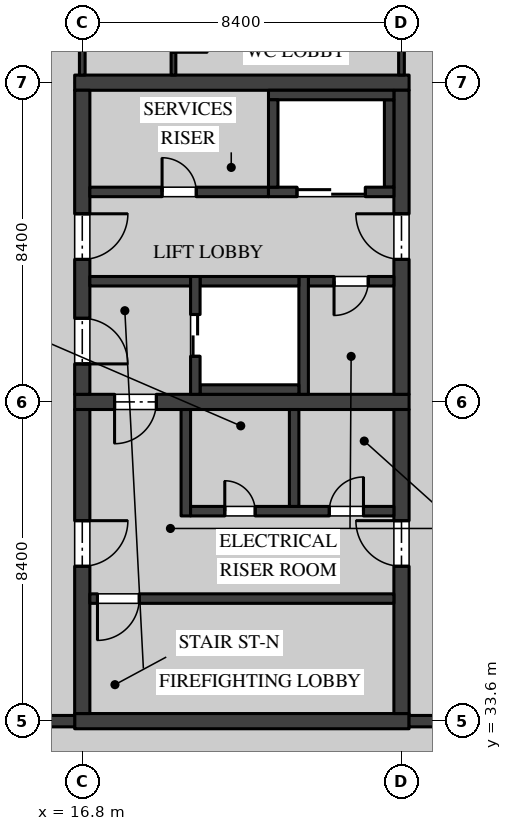
"""IFC4 building model, lengths in metres.
Left out: names, types, materials, properties, quantities, classifications, styles, units other than length and angle.
Written with IfcOpenShell. Run it as: python <this file> out.ifc"""

import sys

from ifc_helpers import new_model, si_unit, direction, frame, frame_2d, origin, place, context, subcontext, project, spatial, rectangle, extrude, element, fill, save


model = new_model("IFC4")
c1 = context("Model", 3, precision=1e-05, world=origin(), true_north=direction((0.0, 1.0)))
c2 = subcontext(c1, "Body", "Model", "MODEL_VIEW")
j1 = project(units=[si_unit("LENGTHUNIT", "METRE"), si_unit("PLANEANGLEUNIT", "RADIAN")], contexts=[c1])
p1 = place(None, origin())
s1 = spatial("IfcSite", under=j1, at=p1, CompositionType="ELEMENT")
p2 = place(p1, origin())
s2 = spatial("IfcBuilding", under=s1, at=p2, CompositionType="ELEMENT")
p3 = place(p2, frame((0.0, 0.0, 5.4)))
s3 = spatial("IfcBuildingStorey", under=s2, at=p3, CompositionType="ELEMENT", Elevation=5.4)
p4 = place(p3, frame((16.6, 42.0, 0.0), z_axis=(0.0, 0.0, 1.0), x_axis=(1.0, 0.0, 0.0)))
e1 = element("IfcWall", 1, at=p4, inside=s3, PredefinedType="SHEAR", context=c2, shape_type="SweptSolid", body=[
    extrude(rectangle(XDim=8.8, YDim=0.4, at=frame_2d((4.4, 0.0))), origin(), (0.0, 0.0, 1.0), 4.37),
])
p5 = place(p4, frame((1.05, 0.0, 0.0)))
e2 = element("IfcOpeningElement", 2, at=p5, cuts=e1, PredefinedType="OPENING", context=c2, shape_type="SweptSolid", body=[
    extrude(rectangle(XDim=1.1, YDim=2.1, at=frame_2d((0.55, 1.05))), frame((0.0, 0.21, 0.0), z_axis=(0.0, -1.0, 0.0), x_axis=(1.0, 0.0, 0.0)), (0.0, 0.0, 1.0), 0.42),
])
p6 = place(p3, frame((16.6, 50.4, 0.0), z_axis=(0.0, 0.0, 1.0), x_axis=(1.0, 0.0, 0.0)))
e3 = element("IfcWall", 3, at=p6, inside=s3, PredefinedType="SHEAR", context=c2, shape_type="SweptSolid", body=[
    extrude(rectangle(XDim=8.8, YDim=0.4, at=frame_2d((4.4, 0.0))), origin(), (0.0, 0.0, 1.0), 4.37),
])
p7 = place(p3, frame((16.8, 42.2, 0.0), z_axis=(0.0, 0.0, 1.0), x_axis=(0.0, 1.0, 0.0)))
e4 = element("IfcWall", 4, at=p7, inside=s3, PredefinedType="SHEAR", context=c2, shape_type="SweptSolid", body=[
    extrude(rectangle(XDim=8.0, YDim=0.4, at=frame_2d((4.0, 0.0))), origin(), (0.0, 0.0, 1.0), 4.37),
])
p8 = place(p7, frame((3.55, 0.0, 0.0)))
e5 = element("IfcOpeningElement", 5, at=p8, cuts=e4, PredefinedType="OPENING", context=c2, shape_type="SweptSolid", body=[
    extrude(rectangle(XDim=1.2, YDim=2.1, at=frame_2d((0.6, 1.05))), frame((0.0, 0.21, 0.0), z_axis=(0.0, -1.0, 0.0), x_axis=(1.0, 0.0, 0.0)), (0.0, 0.0, 1.0), 0.42),
])
p9 = place(p7, frame((0.8, 0.0, 0.0)))
e6 = element("IfcOpeningElement", 6, at=p9, cuts=e4, PredefinedType="OPENING", context=c2, shape_type="SweptSolid", body=[
    extrude(rectangle(XDim=1.2, YDim=2.1, at=frame_2d((0.6, 1.05))), frame((0.0, 0.21, 0.0), z_axis=(0.0, -1.0, 0.0), x_axis=(1.0, 0.0, 0.0)), (0.0, 0.0, 1.0), 0.42),
])
p10 = place(p3, frame((25.2, 42.2, 0.0), z_axis=(0.0, 0.0, 1.0), x_axis=(0.0, 1.0, 0.0)))
e7 = element("IfcWall", 7, at=p10, inside=s3, PredefinedType="SHEAR", context=c2, shape_type="SweptSolid", body=[
    extrude(rectangle(XDim=8.0, YDim=0.4, at=frame_2d((4.0, 0.0))), origin(), (0.0, 0.0, 1.0), 4.37),
])
p11 = place(p10, frame((3.55, 0.0, 0.0)))
e8 = element("IfcOpeningElement", 8, at=p11, cuts=e7, PredefinedType="OPENING", context=c2, shape_type="SweptSolid", body=[
    extrude(rectangle(XDim=1.2, YDim=2.1, at=frame_2d((0.6, 1.05))), frame((0.0, 0.21, 0.0), z_axis=(0.0, -1.0, 0.0), x_axis=(1.0, 0.0, 0.0)), (0.0, 0.0, 1.0), 0.42),
])
p12 = place(p3, frame((21.7, 47.525, 0.0), z_axis=(0.0, 0.0, 1.0), x_axis=(-1.0, 0.0, 0.0)))
e9 = element("IfcWall", 9, at=p12, inside=s3, PredefinedType="SOLIDWALL", context=c2, shape_type="SweptSolid", body=[
    extrude(rectangle(XDim=4.7, YDim=0.25, at=frame_2d((2.35, 0.0))), origin(), (0.0, 0.0, 1.0), 4.37),
])
p13 = place(p12, frame((1.9, 0.0, 0.0)))
e10 = element("IfcOpeningElement", 10, at=p13, cuts=e9, PredefinedType="OPENING", context=c2, shape_type="SweptSolid", body=[
    extrude(rectangle(XDim=0.9, YDim=2.1, at=frame_2d((0.45, 1.05))), frame((0.0, 0.135, 0.0), z_axis=(0.0, -1.0, 0.0), x_axis=(1.0, 0.0, 0.0)), (0.0, 0.0, 1.0), 0.27),
])
p14 = place(p3, frame((25.0, 45.175, 0.0), z_axis=(0.0, 0.0, 1.0), x_axis=(-1.0, 0.0, 0.0)))
e11 = element("IfcWall", 11, at=p14, inside=s3, PredefinedType="SOLIDWALL", context=c2, shape_type="SweptSolid", body=[
    extrude(rectangle(XDim=2.25, YDim=0.25, at=frame_2d((1.125, 0.0))), origin(), (0.0, 0.0, 1.0), 4.37),
])
p15 = place(p14, frame((0.675, 0.0, 0.0)))
e12 = element("IfcOpeningElement", 12, at=p15, cuts=e11, PredefinedType="OPENING", context=c2, shape_type="SweptSolid", body=[
    extrude(rectangle(XDim=0.9, YDim=2.1, at=frame_2d((0.45, 1.05))), frame((0.0, 0.135, 0.0), z_axis=(0.0, -1.0, 0.0), x_axis=(1.0, 0.0, 0.0)), (0.0, 0.0, 1.0), 0.27),
])
p16 = place(p3, frame((19.65, 45.175, 0.0), z_axis=(0.0, 0.0, 1.0), x_axis=(-1.0, 0.0, 0.0)))
e13 = element("IfcWall", 13, at=p16, inside=s3, PredefinedType="SOLIDWALL", context=c2, shape_type="SweptSolid", body=[
    extrude(rectangle(XDim=2.65, YDim=0.25, at=frame_2d((1.325, 0.0))), origin(), (0.0, 0.0, 1.0), 4.37),
])
p17 = place(p3, frame((16.6, 33.6, 0.0), z_axis=(0.0, 0.0, 1.0), x_axis=(1.0, 0.0, 0.0)))
e14 = element("IfcWall", 14, at=p17, inside=s3, PredefinedType="SHEAR", context=c2, shape_type="SweptSolid", body=[
    extrude(rectangle(XDim=8.8, YDim=0.4, at=frame_2d((4.4, 0.0))), origin(), (0.0, 0.0, 1.0), 4.37),
])
p18 = place(p3, frame((16.8, 33.8, 0.0), z_axis=(0.0, 0.0, 1.0), x_axis=(0.0, 1.0, 0.0)))
e15 = element("IfcWall", 15, at=p18, inside=s3, PredefinedType="SHEAR", context=c2, shape_type="SweptSolid", body=[
    extrude(rectangle(XDim=8.0, YDim=0.4, at=frame_2d((4.0, 0.0))), origin(), (0.0, 0.0, 1.0), 4.37),
])
p19 = place(p18, frame((3.875, 0.0, 0.0)))
e16 = element("IfcOpeningElement", 16, at=p19, cuts=e15, PredefinedType="OPENING", context=c2, shape_type="SweptSolid", body=[
    extrude(rectangle(XDim=1.2, YDim=2.1, at=frame_2d((0.6, 1.05))), frame((0.0, 0.21, 0.0), z_axis=(0.0, -1.0, 0.0), x_axis=(1.0, 0.0, 0.0)), (0.0, 0.0, 1.0), 0.42),
])
p20 = place(p3, frame((25.2, 33.8, 0.0), z_axis=(0.0, 0.0, 1.0), x_axis=(0.0, 1.0, 0.0)))
e17 = element("IfcWall", 17, at=p20, inside=s3, PredefinedType="SHEAR", context=c2, shape_type="SweptSolid", body=[
    extrude(rectangle(XDim=8.0, YDim=0.4, at=frame_2d((4.0, 0.0))), origin(), (0.0, 0.0, 1.0), 4.37),
])
p21 = place(p20, frame((3.875, 0.0, 0.0)))
e18 = element("IfcOpeningElement", 18, at=p21, cuts=e17, PredefinedType="OPENING", context=c2, shape_type="SweptSolid", body=[
    extrude(rectangle(XDim=1.2, YDim=2.1, at=frame_2d((0.6, 1.05))), frame((0.0, 0.21, 0.0), z_axis=(0.0, -1.0, 0.0), x_axis=(1.0, 0.0, 0.0)), (0.0, 0.0, 1.0), 0.42),
])
p22 = place(p3, frame((17.0, 36.825, 0.0), z_axis=(0.0, 0.0, 1.0), x_axis=(1.0, 0.0, 0.0)))
e19 = element("IfcWall", 19, at=p22, inside=s3, PredefinedType="SOLIDWALL", context=c2, shape_type="SweptSolid", body=[
    extrude(rectangle(XDim=8.0, YDim=0.25, at=frame_2d((4.0, 0.0))), origin(), (0.0, 0.0, 1.0), 4.37),
])
p23 = place(p22, frame((0.2, 0.0, 0.0)))
e20 = element("IfcOpeningElement", 20, at=p23, cuts=e19, PredefinedType="OPENING", context=c2, shape_type="SweptSolid", body=[
    extrude(rectangle(XDim=1.1, YDim=2.1, at=frame_2d((0.55, 1.05))), frame((0.0, 0.135, 0.0), z_axis=(0.0, -1.0, 0.0), x_axis=(1.0, 0.0, 0.0)), (0.0, 0.0, 1.0), 0.27),
])
p24 = place(p3, frame((19.525, 39.0, 0.0), z_axis=(0.0, 0.0, 1.0), x_axis=(0.0, 1.0, 0.0)))
e21 = element("IfcWall", 21, at=p24, inside=s3, PredefinedType="SOLIDWALL", context=c2, shape_type="SweptSolid", body=[
    extrude(rectangle(XDim=2.8, YDim=0.25, at=frame_2d((1.4, 0.0))), origin(), (0.0, 0.0, 1.0), 4.37),
])
p25 = place(p3, frame((19.65, 39.125, 0.0), z_axis=(0.0, 0.0, 1.0), x_axis=(1.0, 0.0, 0.0)))
e22 = element("IfcWall", 22, at=p25, inside=s3, PredefinedType="SOLIDWALL", context=c2, shape_type="SweptSolid", body=[
    extrude(rectangle(XDim=5.35, YDim=0.25, at=frame_2d((2.675, 0.0))), origin(), (0.0, 0.0, 1.0), 4.37),
])
p26 = place(p25, frame((3.65, 0.0, 0.0)))
e23 = element("IfcOpeningElement", 23, at=p26, cuts=e22, PredefinedType="OPENING", context=c2, shape_type="SweptSolid", body=[
    extrude(rectangle(XDim=0.9, YDim=2.1, at=frame_2d((0.45, 1.05))), frame((0.0, 0.135, 0.0), z_axis=(0.0, -1.0, 0.0), x_axis=(1.0, 0.0, 0.0)), (0.0, 0.0, 1.0), 0.27),
])
p27 = place(p25, frame((0.9, 0.0, 0.0)))
e24 = element("IfcOpeningElement", 24, at=p27, cuts=e22, PredefinedType="OPENING", context=c2, shape_type="SweptSolid", body=[
    extrude(rectangle(XDim=0.8, YDim=2.1, at=frame_2d((0.4, 1.05))), frame((0.0, 0.135, 0.0), z_axis=(0.0, -1.0, 0.0), x_axis=(1.0, 0.0, 0.0)), (0.0, 0.0, 1.0), 0.27),
])
p28 = place(p3, frame((22.375, 39.25, 0.0), z_axis=(0.0, 0.0, 1.0), x_axis=(0.0, 1.0, 0.0)))
e25 = element("IfcWall", 25, at=p28, inside=s3, PredefinedType="SOLIDWALL", context=c2, shape_type="SweptSolid", body=[
    extrude(rectangle(XDim=2.55, YDim=0.25, at=frame_2d((1.275, 0.0))), origin(), (0.0, 0.0, 1.0), 4.37),
])
p29 = place(p3, frame((24.875, 47.65, 0.0), z_axis=(0.0, 0.0, 1.0), x_axis=(0.0, 1.0, 0.0)))
e26 = element("IfcWall", 26, at=p29, inside=s3, PredefinedType="SOLIDWALL", context=c2, shape_type="SweptSolid", body=[
    extrude(rectangle(XDim=2.3, YDim=0.25, at=frame_2d((1.15, 0.0))), origin(), (0.0, 0.0, 1.0), 4.37),
])
p30 = place(p3, frame((21.7, 50.075, 0.0), z_axis=(0.0, 0.0, 1.0), x_axis=(1.0, 0.0, 0.0)))
e27 = element("IfcWall", 27, at=p30, inside=s3, PredefinedType="SOLIDWALL", context=c2, shape_type="SweptSolid", body=[
    extrude(rectangle(XDim=3.3, YDim=0.25, at=frame_2d((1.65, 0.0))), origin(), (0.0, 0.0, 1.0), 4.37),
])
p31 = place(p3, frame((21.7, 47.525, 0.0), z_axis=(0.0, 0.0, 1.0), x_axis=(1.0, 0.0, 0.0)))
e28 = element("IfcWall", 28, at=p31, inside=s3, PredefinedType="SOLIDWALL", context=c2, shape_type="SweptSolid", body=[
    extrude(rectangle(XDim=3.3, YDim=0.25, at=frame_2d((1.65, 0.0))), origin(), (0.0, 0.0, 1.0), 4.37),
])
p32 = place(p31, frame((0.75, 0.0, 0.0)))
e29 = element("IfcOpeningElement", 29, at=p32, cuts=e28, PredefinedType="OPENING", context=c2, shape_type="SweptSolid", body=[
    extrude(rectangle(XDim=1.8, YDim=2.1, at=frame_2d((0.9, 1.05))), frame((0.0, 0.135, 0.0), z_axis=(0.0, -1.0, 0.0), x_axis=(1.0, 0.0, 0.0)), (0.0, 0.0, 1.0), 0.27),
])
p33 = place(p3, frame((21.825, 47.65, 0.0), z_axis=(0.0, 0.0, 1.0), x_axis=(0.0, 1.0, 0.0)))
e30 = element("IfcWall", 30, at=p33, inside=s3, PredefinedType="SOLIDWALL", context=c2, shape_type="SweptSolid", body=[
    extrude(rectangle(XDim=2.3, YDim=0.25, at=frame_2d((1.15, 0.0))), origin(), (0.0, 0.0, 1.0), 4.37),
])
p34 = place(p3, frame((22.625, 42.2, 0.0), z_axis=(0.0, 0.0, 1.0), x_axis=(0.0, 1.0, 0.0)))
e31 = element("IfcWall", 31, at=p34, inside=s3, PredefinedType="SOLIDWALL", context=c2, shape_type="SweptSolid", body=[
    extrude(rectangle(XDim=3.1, YDim=0.25, at=frame_2d((1.55, 0.0))), origin(), (0.0, 0.0, 1.0), 4.37),
])
for number, where, z_axis, x_axis in (
    (32, (19.9, 45.175, 0.0), (0.0, 0.0, 1.0), (1.0, 0.0, 0.0)),
    (33, (19.9, 42.325, 0.0), (0.0, 0.0, 1.0), (1.0, 0.0, 0.0)),
):
    element("IfcWall", number, at=place(p3, frame(where, z_axis=z_axis, x_axis=x_axis)), inside=s3, PredefinedType="SOLIDWALL", context=c2, shape_type="SweptSolid", body=[
        extrude(rectangle(XDim=2.6, YDim=0.25, at=frame_2d((1.3, 0.0))), origin(), (0.0, 0.0, 1.0), 4.37),
    ])
p35 = place(p3, frame((19.775, 42.2, 0.0), z_axis=(0.0, 0.0, 1.0), x_axis=(0.0, 1.0, 0.0)))
e34 = element("IfcWall", 34, at=p35, inside=s3, PredefinedType="SOLIDWALL", context=c2, shape_type="SweptSolid", body=[
    extrude(rectangle(XDim=3.1, YDim=0.25, at=frame_2d((1.55, 0.0))), origin(), (0.0, 0.0, 1.0), 4.37),
])
p36 = place(p35, frame((1.0, 0.0, 0.0)))
e35 = element("IfcOpeningElement", 35, at=p36, cuts=e34, PredefinedType="OPENING", context=c2, shape_type="SweptSolid", body=[
    extrude(rectangle(XDim=1.1, YDim=2.1, at=frame_2d((0.55, 1.05))), frame((0.0, 0.135, 0.0), z_axis=(0.0, -1.0, 0.0), x_axis=(1.0, 0.0, 0.0)), (0.0, 0.0, 1.0), 0.27),
])
p37 = place(p3, frame((25.2, 50.6, 0.0), z_axis=(0.0, 0.0, 1.0), x_axis=(0.0, 1.0, 0.0)))
e36 = element("IfcWall", 36, at=p37, inside=s3, PredefinedType="PARTITIONING", context=c2, shape_type="SweptSolid", body=[
    extrude(rectangle(XDim=2.8, YDim=0.15, at=frame_2d((1.4, 0.0))), origin(), (0.0, 0.0, 1.0), 3.746),
])
p38 = place(p3, frame((16.8, 50.6, 0.0), z_axis=(0.0, 0.0, 1.0), x_axis=(0.0, 1.0, 0.0)))
e37 = element("IfcWall", 37, at=p38, inside=s3, PredefinedType="PARTITIONING", context=c2, shape_type="SweptSolid", body=[
    extrude(rectangle(XDim=8.0, YDim=0.15, at=frame_2d((4.0, 0.0))), origin(), (0.0, 0.0, 1.0), 3.746),
])
p39 = place(p38, frame((2.35, 0.0, 0.0)))
e38 = element("IfcOpeningElement", 38, at=p39, cuts=e37, PredefinedType="OPENING", context=c2, shape_type="SweptSolid", body=[
    extrude(rectangle(XDim=0.9, YDim=2.1, at=frame_2d((0.45, 1.05))), frame((0.0, 0.085, 0.0), z_axis=(0.0, -1.0, 0.0), x_axis=(1.0, 0.0, 0.0)), (0.0, 0.0, 1.0), 0.17),
])
p40 = place(p3, frame((19.2, 50.6, 0.0), z_axis=(0.0, 0.0, 1.0), x_axis=(0.0, 1.0, 0.0)))
e39 = element("IfcWall", 39, at=p40, inside=s3, PredefinedType="PARTITIONING", context=c2, shape_type="SweptSolid", body=[
    extrude(rectangle(XDim=2.8, YDim=0.125, at=frame_2d((1.4, 0.0))), origin(), (0.0, 0.0, 1.0), 4.37),
])
p41 = place(p40, frame((0.6, 0.0, 0.0)))
e40 = element("IfcOpeningElement", 40, at=p41, cuts=e39, PredefinedType="OPENING", context=c2, shape_type="SweptSolid", body=[
    extrude(rectangle(XDim=0.9, YDim=2.1, at=frame_2d((0.45, 1.05))), frame((0.0, 0.073, 0.0), z_axis=(0.0, -1.0, 0.0), x_axis=(1.0, 0.0, 0.0)), (0.0, 0.0, 1.0), 0.145),
])
for number, where, z_axis, x_axis in (
    (41, (33.22, 33.6, 0.0), (0.0, 0.0, 1.0), (-1.0, 0.0, 0.0)),
    (42, (16.6, 33.6, 0.0), (0.0, 0.0, 1.0), (-1.0, 0.0, 0.0)),
):
    element("IfcWall", number, at=place(p3, frame(where, z_axis=z_axis, x_axis=x_axis)), inside=s3, PredefinedType="SOLIDWALL", context=c2, shape_type="SweptSolid", body=[
        extrude(rectangle(XDim=7.82, YDim=0.3, at=frame_2d((3.91, 0.0))), origin(), (0.0, 0.0, 1.0), 3.746),
    ])
p42 = place(p8, frame((1.2, 0.0, 0.0), z_axis=(0.0, 0.0, 1.0), x_axis=(-1.0, 0.0, 0.0)))
e43 = element("IfcDoor", 43, at=p42, inside=s3, OperationType="SINGLE_SWING_RIGHT", PredefinedType="DOOR", context=c2, shape_type="SweptSolid", body=[
    extrude(rectangle(XDim=1.2, YDim=2.1, at=frame_2d((0.6, 1.05))), frame((0.0, 0.035, 0.0), z_axis=(0.0, -1.0, 0.0), x_axis=(1.0, 0.0, 0.0)), (0.0, 0.0, 1.0), 0.07),
])
fill(e5, e43)
p43 = place(p11, origin())
e44 = element("IfcDoor", 44, at=p43, inside=s3, OperationType="SINGLE_SWING_LEFT", PredefinedType="DOOR", context=c2, shape_type="SweptSolid", body=[
    extrude(rectangle(XDim=1.2, YDim=2.1, at=frame_2d((0.6, 1.05))), frame((0.0, 0.035, 0.0), z_axis=(0.0, -1.0, 0.0), x_axis=(1.0, 0.0, 0.0)), (0.0, 0.0, 1.0), 0.07),
])
fill(e8, e44)
p44 = place(p9, frame((1.2, 0.0, 0.0), z_axis=(0.0, 0.0, 1.0), x_axis=(-1.0, 0.0, 0.0)))
e45 = element("IfcDoor", 45, at=p44, inside=s3, OperationType="SINGLE_SWING_LEFT", PredefinedType="DOOR", context=c2, shape_type="SweptSolid", body=[
    extrude(rectangle(XDim=1.2, YDim=2.1, at=frame_2d((0.6, 1.05))), frame((0.0, 0.035, 0.0), z_axis=(0.0, -1.0, 0.0), x_axis=(1.0, 0.0, 0.0)), (0.0, 0.0, 1.0), 0.07),
])
fill(e6, e45)
p45 = place(p5, frame((1.1, 0.0, 0.0), z_axis=(0.0, 0.0, 1.0), x_axis=(-1.0, 0.0, 0.0)))
e46 = element("IfcDoor", 46, at=p45, inside=s3, OperationType="SINGLE_SWING_LEFT", PredefinedType="DOOR", context=c2, shape_type="SweptSolid", body=[
    extrude(rectangle(XDim=1.1, YDim=2.1, at=frame_2d((0.55, 1.05))), frame((0.0, 0.035, 0.0), z_axis=(0.0, -1.0, 0.0), x_axis=(1.0, 0.0, 0.0)), (0.0, 0.0, 1.0), 0.07),
])
fill(e2, e46)
p46 = place(p13, frame((0.9, 0.0, 0.0), z_axis=(0.0, 0.0, 1.0), x_axis=(-1.0, 0.0, 0.0)))
e47 = element("IfcDoor", 47, at=p46, inside=s3, OperationType="SINGLE_SWING_RIGHT", PredefinedType="DOOR", context=c2, shape_type="SweptSolid", body=[
    extrude(rectangle(XDim=0.9, YDim=2.1, at=frame_2d((0.45, 1.05))), frame((0.0, 0.035, 0.0), z_axis=(0.0, -1.0, 0.0), x_axis=(1.0, 0.0, 0.0)), (0.0, 0.0, 1.0), 0.07),
])
fill(e10, e47)
p47 = place(p15, origin())
e48 = element("IfcDoor", 48, at=p47, inside=s3, OperationType="SINGLE_SWING_LEFT", PredefinedType="DOOR", context=c2, shape_type="SweptSolid", body=[
    extrude(rectangle(XDim=0.9, YDim=2.1, at=frame_2d((0.45, 1.05))), frame((0.0, 0.05, 0.0), z_axis=(0.0, -1.0, 0.0), x_axis=(1.0, 0.0, 0.0)), (0.0, 0.0, 1.0), 0.1),
])
fill(e12, e48)
p48 = place(p26, origin())
e49 = element("IfcDoor", 49, at=p48, inside=s3, OperationType="SINGLE_SWING_LEFT", PredefinedType="DOOR", context=c2, shape_type="SweptSolid", body=[
    extrude(rectangle(XDim=0.9, YDim=2.1, at=frame_2d((0.45, 1.05))), frame((0.0, 0.035, 0.0), z_axis=(0.0, -1.0, 0.0), x_axis=(1.0, 0.0, 0.0)), (0.0, 0.0, 1.0), 0.07),
])
fill(e23, e49)
p49 = place(p19, frame((1.2, 0.0, 0.0), z_axis=(0.0, 0.0, 1.0), x_axis=(-1.0, 0.0, 0.0)))
e50 = element("IfcDoor", 50, at=p49, inside=s3, OperationType="SINGLE_SWING_RIGHT", PredefinedType="DOOR", context=c2, shape_type="SweptSolid", body=[
    extrude(rectangle(XDim=1.2, YDim=2.1, at=frame_2d((0.6, 1.05))), frame((0.0, 0.035, 0.0), z_axis=(0.0, -1.0, 0.0), x_axis=(1.0, 0.0, 0.0)), (0.0, 0.0, 1.0), 0.07),
])
fill(e16, e50)
p50 = place(p21, origin())
e51 = element("IfcDoor", 51, at=p50, inside=s3, OperationType="SINGLE_SWING_LEFT", PredefinedType="DOOR", context=c2, shape_type="SweptSolid", body=[
    extrude(rectangle(XDim=1.2, YDim=2.1, at=frame_2d((0.6, 1.05))), frame((0.0, 0.035, 0.0), z_axis=(0.0, -1.0, 0.0), x_axis=(1.0, 0.0, 0.0)), (0.0, 0.0, 1.0), 0.07),
])
fill(e18, e51)
p51 = place(p27, origin())
e52 = element("IfcDoor", 52, at=p51, inside=s3, OperationType="SINGLE_SWING_RIGHT", PredefinedType="DOOR", context=c2, shape_type="SweptSolid", body=[
    extrude(rectangle(XDim=0.8, YDim=2.1, at=frame_2d((0.4, 1.05))), frame((0.0, 0.035, 0.0), z_axis=(0.0, -1.0, 0.0), x_axis=(1.0, 0.0, 0.0)), (0.0, 0.0, 1.0), 0.07),
])
fill(e24, e52)
p52 = place(p23, frame((1.1, 0.0, 0.0), z_axis=(0.0, 0.0, 1.0), x_axis=(-1.0, 0.0, 0.0)))
e53 = element("IfcDoor", 53, at=p52, inside=s3, OperationType="SINGLE_SWING_LEFT", PredefinedType="DOOR", context=c2, shape_type="SweptSolid", body=[
    extrude(rectangle(XDim=1.1, YDim=2.1, at=frame_2d((0.55, 1.05))), frame((0.0, 0.035, 0.0), z_axis=(0.0, -1.0, 0.0), x_axis=(1.0, 0.0, 0.0)), (0.0, 0.0, 1.0), 0.07),
])
fill(e20, e53)
p53 = place(p32, origin())
e54 = element("IfcDoor", 54, at=p53, inside=s3, OperationType="DOUBLE_DOOR_SLIDING", PredefinedType="DOOR", context=c2, shape_type="SweptSolid", body=[
    extrude(rectangle(XDim=1.8, YDim=2.1, at=frame_2d((0.9, 1.05))), frame((0.0, 0.04, 0.0), z_axis=(0.0, -1.0, 0.0), x_axis=(1.0, 0.0, 0.0)), (0.0, 0.0, 1.0), 0.08),
])
fill(e29, e54)
p54 = place(p36, origin())
e55 = element("IfcDoor", 55, at=p54, inside=s3, OperationType="DOUBLE_DOOR_SLIDING", PredefinedType="DOOR", context=c2, shape_type="SweptSolid", body=[
    extrude(rectangle(XDim=1.1, YDim=2.1, at=frame_2d((0.55, 1.05))), frame((0.0, 0.04, 0.0), z_axis=(0.0, -1.0, 0.0), x_axis=(1.0, 0.0, 0.0)), (0.0, 0.0, 1.0), 0.08),
])
fill(e35, e55)
save(model, sys.argv[1])
